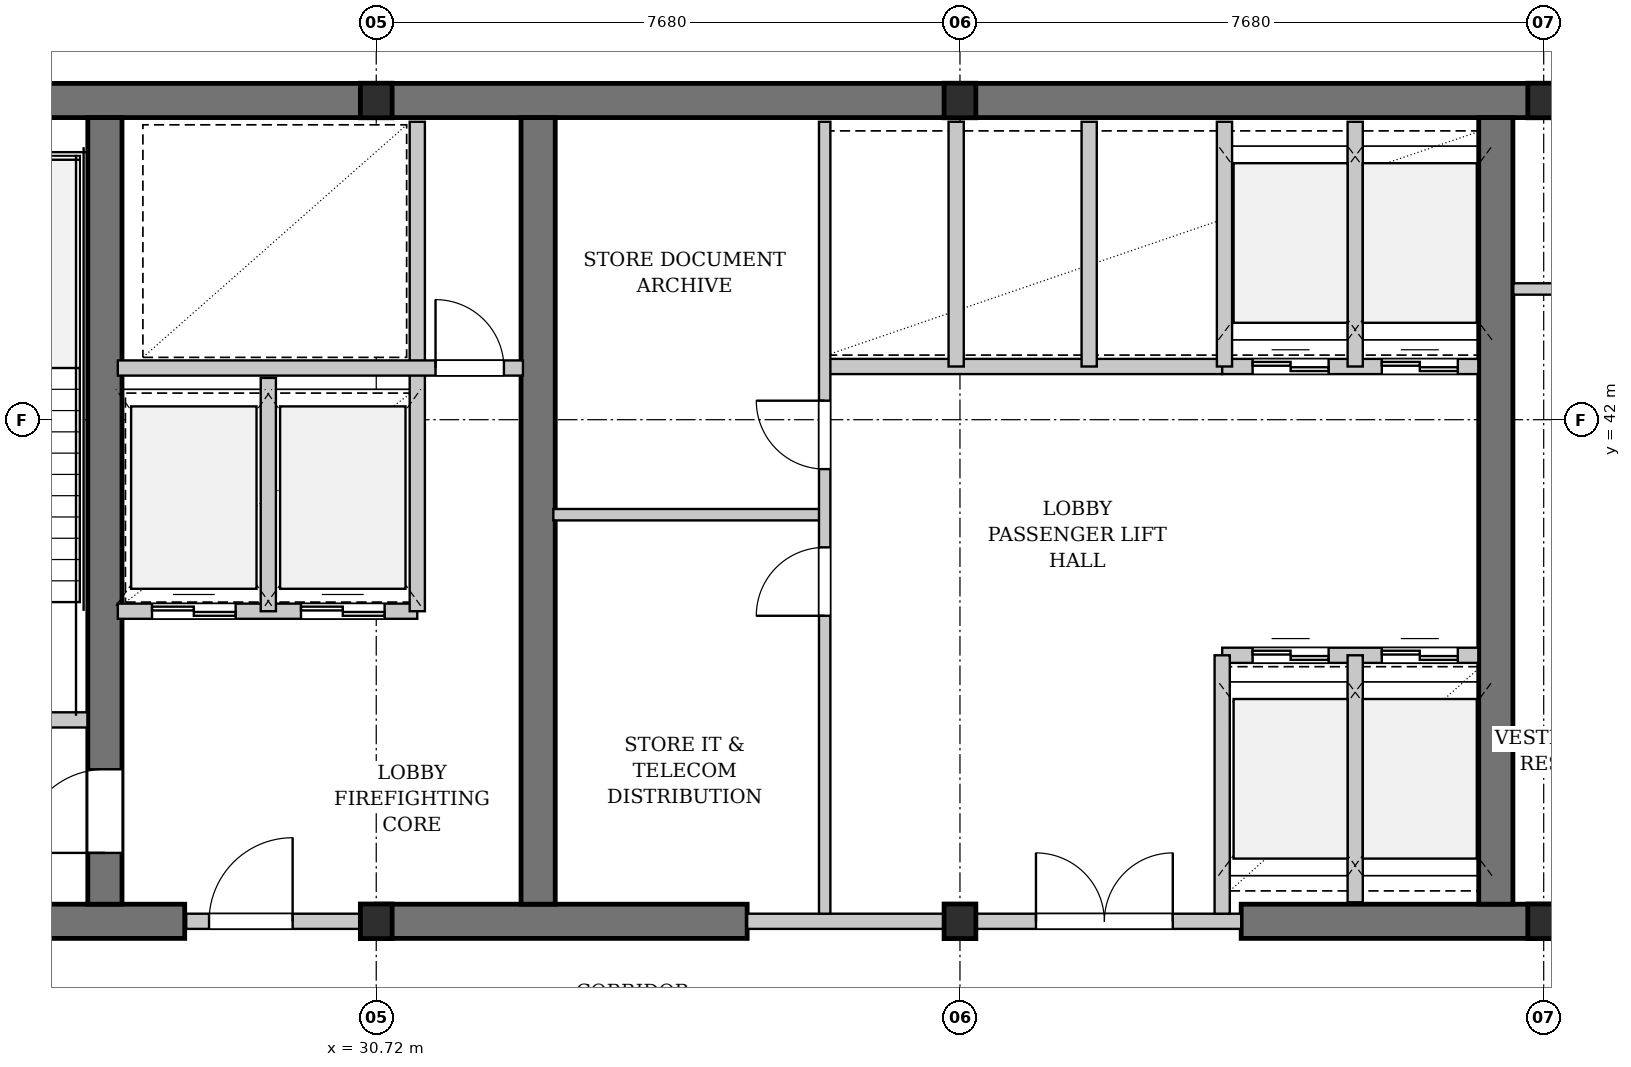
"""IFC4 building model, lengths in metres.
Left out: names, types, materials, properties, quantities, classifications, styles, units other than length and angle.
Written with IfcOpenShell. Run it as: python <this file> out.ifc"""

import sys

from ifc_helpers import new_model, si_unit, direction, frame, frame_2d, origin, origin_2d, place, context, subcontext, project, spatial, rectangle, i_section, extrude, element, fill, save


model = new_model("IFC4")
c1 = context("Model", 3, precision=1e-05, world=origin(), true_north=direction((0.0, 1.0)))
c2 = subcontext(c1, "Body", "Model", "MODEL_VIEW")
j1 = project(units=[si_unit("LENGTHUNIT", "METRE"), si_unit("PLANEANGLEUNIT", "RADIAN")], contexts=[c1])
p1 = place(None, origin())
s1 = spatial("IfcSite", under=j1, at=p1, CompositionType="ELEMENT")
p2 = place(p1, origin())
s2 = spatial("IfcBuilding", under=s1, at=p2, CompositionType="ELEMENT")
p3 = place(p2, frame((0.0, 0.0, 200.3)))
s3 = spatial("IfcBuildingStorey", under=s2, at=p3, CompositionType="ELEMENT", Elevation=200.3)
p4 = place(p3, frame((22.815, 46.2, 0.0), z_axis=(0.0, 0.0, 1.0), x_axis=(1.0, 0.0, 0.0)))
e1 = element("IfcWall", 1, at=p4, inside=s3, PredefinedType="SHEAR", context=c2, shape_type="SweptSolid", body=[
    extrude(rectangle(XDim=31.17, YDim=0.45, at=frame_2d((15.585, 0.0))), origin(), (0.0, 0.0, 1.0), 3.78),
])
p5 = place(p3, frame((22.815, 35.4, 0.0), z_axis=(0.0, 0.0, 1.0), x_axis=(1.0, 0.0, 0.0)))
e2 = element("IfcWall", 2, at=p5, inside=s3, PredefinedType="SHEAR", context=c2, shape_type="SweptSolid", body=[
    extrude(rectangle(XDim=5.385, YDim=0.45, at=frame_2d((2.692, 0.0))), origin(), (0.0, 0.0, 1.0), 3.78),
])
p6 = place(p3, frame((30.72, 35.4, 0.0), z_axis=(0.0, 0.0, 1.0), x_axis=(1.0, 0.0, 0.0)))
e3 = element("IfcWall", 3, at=p6, inside=s3, PredefinedType="SHEAR", context=c2, shape_type="SweptSolid", body=[
    extrude(rectangle(XDim=4.88, YDim=0.45, at=frame_2d((2.44, 0.0))), origin(), (0.0, 0.0, 1.0), 3.78),
])
p7 = place(p3, frame((42.1, 35.4, 0.0), z_axis=(0.0, 0.0, 1.0), x_axis=(1.0, 0.0, 0.0)))
e4 = element("IfcWall", 4, at=p7, inside=s3, PredefinedType="SHEAR", context=c2, shape_type="SweptSolid", body=[
    extrude(rectangle(XDim=8.05, YDim=0.45, at=frame_2d((4.025, 0.0))), origin(), (0.0, 0.0, 1.0), 3.78),
])
p8 = place(p7, frame((4.85, 0.0, 0.0)))
e5 = element("IfcOpeningElement", 5, at=p8, cuts=e4, PredefinedType="OPENING", context=c2, shape_type="SweptSolid", body=[
    extrude(rectangle(XDim=0.9, YDim=2.15, at=frame_2d((0.45, 1.075))), frame((0.0, 0.235, 0.0), z_axis=(0.0, -1.0, 0.0), x_axis=(1.0, 0.0, 0.0)), (0.0, 0.0, 1.0), 0.47),
])
p9 = place(p3, frame((27.15, 35.625, 0.0), z_axis=(0.0, 0.0, 1.0), x_axis=(0.0, 1.0, 0.0)))
e6 = element("IfcWall", 6, at=p9, inside=s3, PredefinedType="SHEAR", context=c2, shape_type="SweptSolid", body=[
    extrude(rectangle(XDim=10.35, YDim=0.45, at=frame_2d((5.175, 0.0))), origin(), (0.0, 0.0, 1.0), 3.78),
])
p10 = place(p9, frame((0.675, 0.0, 0.0)))
e7 = element("IfcOpeningElement", 7, at=p10, cuts=e6, PredefinedType="OPENING", context=c2, shape_type="SweptSolid", body=[
    extrude(rectangle(XDim=1.1, YDim=2.15, at=frame_2d((0.55, 1.075))), frame((0.0, 0.235, 0.0), z_axis=(0.0, -1.0, 0.0), x_axis=(1.0, 0.0, 0.0)), (0.0, 0.0, 1.0), 0.47),
])
for number, where, z_axis, x_axis in (
    (8, (32.85, 35.625, 0.0), (0.0, 0.0, 1.0), (0.0, 1.0, 0.0)),
    (9, (45.45, 35.625, 0.0), (0.0, 0.0, 1.0), (0.0, 1.0, 0.0)),
):
    element("IfcWall", number, at=place(p3, frame(where, z_axis=z_axis, x_axis=x_axis)), inside=s3, PredefinedType="SHEAR", context=c2, shape_type="SweptSolid", body=[
        extrude(rectangle(XDim=10.35, YDim=0.45, at=frame_2d((5.175, 0.0))), origin(), (0.0, 0.0, 1.0), 3.78),
    ])
for number, where, z_axis, x_axis in (
    (10, (30.72, 35.4, 0.0), (0.0, 0.0, 1.0), (1.0, 0.0, 0.0)),
    (11, (30.72, 46.2, 0.0), (0.0, 0.0, 1.0), (1.0, 0.0, 0.0)),
    (12, (38.4, 35.4, 0.0), (0.0, 0.0, 1.0), (1.0, 0.0, 0.0)),
    (13, (38.4, 46.2, 0.0), (0.0, 0.0, 1.0), (1.0, 0.0, 0.0)),
    (14, (46.08, 35.4, 0.0), (0.0, 0.0, 1.0), (1.0, 0.0, 0.0)),
    (15, (46.08, 46.2, 0.0), (0.0, 0.0, 1.0), (1.0, 0.0, 0.0)),
):
    element("IfcColumn", number, at=place(p3, frame(where, z_axis=z_axis, x_axis=x_axis)), inside=s3, PredefinedType="COLUMN", context=c2, shape_type="SweptSolid", body=[
        extrude(i_section(OverallWidth=0.418, OverallDepth=0.455, WebThickness=0.042, FlangeThickness=0.068, FilletRadius=0.015, at=origin_2d()), origin(), (0.0, 0.0, 1.0), 4.2),
    ])
p11 = place(p3, frame((23.3, 38.05, 0.0), z_axis=(0.0, 0.0, 1.0), x_axis=(1.0, 0.0, 0.0)))
e16 = element("IfcWall", 16, at=p11, inside=s3, PredefinedType="PARTITIONING", context=c2, shape_type="SweptSolid", body=[
    extrude(rectangle(XDim=3.62, YDim=0.2, at=frame_2d((1.81, 0.0))), origin(), (0.0, 0.0, 1.0), 3.78),
])
p12 = place(p11, frame((1.26, 0.0, 0.0)))
e17 = element("IfcOpeningElement", 17, at=p12, cuts=e16, PredefinedType="OPENING", context=c2, shape_type="SweptSolid", body=[
    extrude(rectangle(XDim=1.1, YDim=2.15, at=frame_2d((0.55, 1.075))), frame((0.0, 0.11, 0.0), z_axis=(0.0, -1.0, 0.0), x_axis=(1.0, 0.0, 0.0)), (0.0, 0.0, 1.0), 0.22),
])
p13 = place(p3, frame((28.22, 35.4, 0.0), z_axis=(0.0, 0.0, 1.0), x_axis=(1.0, 0.0, 0.0)))
e18 = element("IfcWall", 18, at=p13, inside=s3, PredefinedType="PARTITIONING", context=c2, shape_type="SweptSolid", body=[
    extrude(rectangle(XDim=2.5, YDim=0.2, at=frame_2d((1.25, 0.0))), origin(), (0.0, 0.0, 1.0), 2.961),
])
p14 = place(p13, frame((0.3, 0.0, 0.0)))
e19 = element("IfcOpeningElement", 19, at=p14, cuts=e18, PredefinedType="OPENING", context=c2, shape_type="SweptSolid", body=[
    extrude(rectangle(XDim=1.1, YDim=2.15, at=frame_2d((0.55, 1.075))), frame((0.0, 0.11, 0.0), z_axis=(0.0, -1.0, 0.0), x_axis=(1.0, 0.0, 0.0)), (0.0, 0.0, 1.0), 0.22),
])
p15 = place(p3, frame((27.32, 39.48, 0.0), z_axis=(0.0, 0.0, 1.0), x_axis=(1.0, 0.0, 0.0)))
e20 = element("IfcWall", 20, at=p15, inside=s3, PredefinedType="PARTITIONING", context=c2, shape_type="SweptSolid", body=[
    extrude(rectangle(XDim=3.94, YDim=0.2, at=frame_2d((1.97, 0.0))), origin(), (0.0, 0.0, 1.0), 3.78),
])
p16 = place(p15, frame((0.45, 0.0, 0.0)))
e21 = element("IfcOpeningElement", 21, at=p16, cuts=e20, PredefinedType="OPENING", context=c2, shape_type="SweptSolid", body=[
    extrude(rectangle(XDim=1.1, YDim=2.2, at=frame_2d((0.55, 1.1))), frame((0.0, 0.11, 0.0), z_axis=(0.0, -1.0, 0.0), x_axis=(1.0, 0.0, 0.0)), (0.0, 0.0, 1.0), 0.22),
])
p17 = place(p15, frame((2.41, 0.0, 0.0)))
e22 = element("IfcOpeningElement", 22, at=p17, cuts=e20, PredefinedType="OPENING", context=c2, shape_type="SweptSolid", body=[
    extrude(rectangle(XDim=1.1, YDim=2.2, at=frame_2d((0.55, 1.1))), frame((0.0, 0.11, 0.0), z_axis=(0.0, -1.0, 0.0), x_axis=(1.0, 0.0, 0.0)), (0.0, 0.0, 1.0), 0.22),
])
p18 = place(p3, frame((29.3, 39.48, 0.0), z_axis=(0.0, 0.0, 1.0), x_axis=(0.0, 1.0, 0.0)))
e23 = element("IfcWall", 23, at=p18, inside=s3, PredefinedType="PARTITIONING", context=c2, shape_type="SweptSolid", body=[
    extrude(rectangle(XDim=3.07, YDim=0.2, at=frame_2d((1.535, 0.0))), origin(), (0.0, 0.0, 1.0), 3.78),
])
p19 = place(p3, frame((31.26, 39.48, 0.0), z_axis=(0.0, 0.0, 1.0), x_axis=(0.0, 1.0, 0.0)))
e24 = element("IfcWall", 24, at=p19, inside=s3, PredefinedType="PARTITIONING", context=c2, shape_type="SweptSolid", body=[
    extrude(rectangle(XDim=6.44, YDim=0.2, at=frame_2d((3.22, 0.0))), origin(), (0.0, 0.0, 1.0), 3.78),
])
p20 = place(p3, frame((27.32, 42.68, 0.0), z_axis=(0.0, 0.0, 1.0), x_axis=(1.0, 0.0, 0.0)))
e25 = element("IfcWall", 25, at=p20, inside=s3, PredefinedType="PARTITIONING", context=c2, shape_type="SweptSolid", body=[
    extrude(rectangle(XDim=5.33, YDim=0.2, at=frame_2d((2.665, 0.0))), origin(), (0.0, 0.0, 1.0), 3.78),
])
p21 = place(p20, frame((4.18, 0.0, 0.0)))
e26 = element("IfcOpeningElement", 26, at=p21, cuts=e25, PredefinedType="OPENING", context=c2, shape_type="SweptSolid", body=[
    extrude(rectangle(XDim=0.9, YDim=2.15, at=frame_2d((0.45, 1.075))), frame((0.0, 0.11, 0.0), z_axis=(0.0, -1.0, 0.0), x_axis=(1.0, 0.0, 0.0)), (0.0, 0.0, 1.0), 0.22),
])
p22 = place(p3, frame((35.6, 35.4, 0.0), z_axis=(0.0, 0.0, 1.0), x_axis=(1.0, 0.0, 0.0)))
e27 = element("IfcWall", 27, at=p22, inside=s3, PredefinedType="PARTITIONING", context=c2, shape_type="SweptSolid", body=[
    extrude(rectangle(XDim=6.5, YDim=0.2, at=frame_2d((3.25, 0.0))), origin(), (0.0, 0.0, 1.0), 2.575),
])
p23 = place(p22, frame((3.8, 0.0, 0.0)))
e28 = element("IfcOpeningElement", 28, at=p23, cuts=e27, PredefinedType="OPENING", context=c2, shape_type="SweptSolid", body=[
    extrude(rectangle(XDim=1.8, YDim=2.3, at=frame_2d((0.9, 1.15))), frame((0.0, 0.11, 0.0), z_axis=(0.0, -1.0, 0.0), x_axis=(1.0, 0.0, 0.0)), (0.0, 0.0, 1.0), 0.22),
])
p24 = place(p3, frame((36.6, 42.7, 0.0), z_axis=(0.0, 0.0, 1.0), x_axis=(1.0, 0.0, 0.0)))
e29 = element("IfcWall", 29, at=p24, inside=s3, PredefinedType="PARTITIONING", context=c2, shape_type="SweptSolid", body=[
    extrude(rectangle(XDim=5.25, YDim=0.2, at=frame_2d((2.625, 0.0))), origin(), (0.0, 0.0, 1.0), 3.78),
])
p25 = place(p3, frame((38.35, 42.7, 0.0), z_axis=(0.0, 0.0, 1.0), x_axis=(0.0, 1.0, 0.0)))
e30 = element("IfcWall", 30, at=p25, inside=s3, PredefinedType="PARTITIONING", context=c2, shape_type="SweptSolid", body=[
    extrude(rectangle(XDim=3.22, YDim=0.2, at=frame_2d((1.61, 0.0))), origin(), (0.0, 0.0, 1.0), 2.575),
])
p26 = place(p3, frame((40.1, 42.7, 0.0), z_axis=(0.0, 0.0, 1.0), x_axis=(0.0, 1.0, 0.0)))
e31 = element("IfcWall", 31, at=p26, inside=s3, PredefinedType="PARTITIONING", context=c2, shape_type="SweptSolid", body=[
    extrude(rectangle(XDim=3.22, YDim=0.2, at=frame_2d((1.61, 0.0))), origin(), (0.0, 0.0, 1.0), 3.78),
])
p27 = place(p3, frame((33.05, 40.75, 0.0), z_axis=(0.0, 0.0, 1.0), x_axis=(1.0, 0.0, 0.0)))
e32 = element("IfcWall", 32, at=p27, inside=s3, PredefinedType="PARTITIONING", context=c2, shape_type="SweptSolid", body=[
    extrude(rectangle(XDim=3.57, YDim=0.15, at=frame_2d((1.785, 0.0))), origin(), (0.0, 0.0, 1.0), 3.78),
])
p28 = place(p3, frame((36.62, 35.5, 0.0), z_axis=(0.0, 0.0, 1.0), x_axis=(0.0, 1.0, 0.0)))
e33 = element("IfcWall", 33, at=p28, inside=s3, PredefinedType="PARTITIONING", context=c2, shape_type="SweptSolid", body=[
    extrude(rectangle(XDim=10.42, YDim=0.15, at=frame_2d((5.21, 0.0))), origin(), (0.0, 0.0, 1.0), 3.78),
])
p29 = place(p28, frame((3.92, 0.0, 0.0)))
e34 = element("IfcOpeningElement", 34, at=p29, cuts=e33, PredefinedType="OPENING", context=c2, shape_type="SweptSolid", body=[
    extrude(rectangle(XDim=0.9, YDim=2.15, at=frame_2d((0.45, 1.075))), frame((0.0, 0.085, 0.0), z_axis=(0.0, -1.0, 0.0), x_axis=(1.0, 0.0, 0.0)), (0.0, 0.0, 1.0), 0.17),
])
p30 = place(p28, frame((5.85, 0.0, 0.0)))
e35 = element("IfcOpeningElement", 35, at=p30, cuts=e33, PredefinedType="OPENING", context=c2, shape_type="SweptSolid", body=[
    extrude(rectangle(XDim=0.9, YDim=2.15, at=frame_2d((0.45, 1.075))), frame((0.0, 0.085, 0.0), z_axis=(0.0, -1.0, 0.0), x_axis=(1.0, 0.0, 0.0)), (0.0, 0.0, 1.0), 0.17),
])
p31 = place(p3, frame((41.85, 38.9, 0.0), z_axis=(0.0, 0.0, 1.0), x_axis=(1.0, 0.0, 0.0)))
e36 = element("IfcWall", 36, at=p31, inside=s3, PredefinedType="PARTITIONING", context=c2, shape_type="SweptSolid", body=[
    extrude(rectangle(XDim=3.37, YDim=0.2, at=frame_2d((1.685, 0.0))), origin(), (0.0, 0.0, 1.0), 3.78),
])
p32 = place(p31, frame((0.4, 0.0, 0.0)))
e37 = element("IfcOpeningElement", 37, at=p32, cuts=e36, PredefinedType="OPENING", context=c2, shape_type="SweptSolid", body=[
    extrude(rectangle(XDim=1.0, YDim=2.2, at=frame_2d((0.5, 1.1))), frame((0.0, 0.11, 0.0), z_axis=(0.0, -1.0, 0.0), x_axis=(1.0, 0.0, 0.0)), (0.0, 0.0, 1.0), 0.22),
])
p33 = place(p31, frame((2.1, 0.0, 0.0)))
e38 = element("IfcOpeningElement", 38, at=p33, cuts=e36, PredefinedType="OPENING", context=c2, shape_type="SweptSolid", body=[
    extrude(rectangle(XDim=1.0, YDim=2.2, at=frame_2d((0.5, 1.1))), frame((0.0, 0.11, 0.0), z_axis=(0.0, -1.0, 0.0), x_axis=(1.0, 0.0, 0.0)), (0.0, 0.0, 1.0), 0.22),
])
p34 = place(p3, frame((41.85, 42.7, 0.0), z_axis=(0.0, 0.0, 1.0), x_axis=(1.0, 0.0, 0.0)))
e39 = element("IfcWall", 39, at=p34, inside=s3, PredefinedType="PARTITIONING", context=c2, shape_type="SweptSolid", body=[
    extrude(rectangle(XDim=3.37, YDim=0.2, at=frame_2d((1.685, 0.0))), origin(), (0.0, 0.0, 1.0), 3.78),
])
p35 = place(p34, frame((0.4, 0.0, 0.0)))
e40 = element("IfcOpeningElement", 40, at=p35, cuts=e39, PredefinedType="OPENING", context=c2, shape_type="SweptSolid", body=[
    extrude(rectangle(XDim=1.0, YDim=2.2, at=frame_2d((0.5, 1.1))), frame((0.0, 0.11, 0.0), z_axis=(0.0, -1.0, 0.0), x_axis=(1.0, 0.0, 0.0)), (0.0, 0.0, 1.0), 0.22),
])
p36 = place(p34, frame((2.1, 0.0, 0.0)))
e41 = element("IfcOpeningElement", 41, at=p36, cuts=e39, PredefinedType="OPENING", context=c2, shape_type="SweptSolid", body=[
    extrude(rectangle(XDim=1.0, YDim=2.2, at=frame_2d((0.5, 1.1))), frame((0.0, 0.11, 0.0), z_axis=(0.0, -1.0, 0.0), x_axis=(1.0, 0.0, 0.0)), (0.0, 0.0, 1.0), 0.22),
])
p37 = place(p3, frame((43.6, 35.65, 0.0), z_axis=(0.0, 0.0, 1.0), x_axis=(0.0, 1.0, 0.0)))
e42 = element("IfcWall", 42, at=p37, inside=s3, PredefinedType="PARTITIONING", context=c2, shape_type="SweptSolid", body=[
    extrude(rectangle(XDim=3.25, YDim=0.2, at=frame_2d((1.625, 0.0))), origin(), (0.0, 0.0, 1.0), 3.78),
])
p38 = place(p3, frame((43.6, 42.7, 0.0), z_axis=(0.0, 0.0, 1.0), x_axis=(0.0, 1.0, 0.0)))
e43 = element("IfcWall", 43, at=p38, inside=s3, PredefinedType="PARTITIONING", context=c2, shape_type="SweptSolid", body=[
    extrude(rectangle(XDim=3.22, YDim=0.2, at=frame_2d((1.61, 0.0))), origin(), (0.0, 0.0, 1.0), 3.78),
])
p39 = place(p3, frame((41.85, 35.5, 0.0), z_axis=(0.0, 0.0, 1.0), x_axis=(0.0, 1.0, 0.0)))
e44 = element("IfcWall", 44, at=p39, inside=s3, PredefinedType="PARTITIONING", context=c2, shape_type="SweptSolid", body=[
    extrude(rectangle(XDim=3.4, YDim=0.2, at=frame_2d((1.7, 0.0))), origin(), (0.0, 0.0, 1.0), 3.78),
])
p40 = place(p3, frame((41.88, 42.7, 0.0), z_axis=(0.0, 0.0, 1.0), x_axis=(0.0, 1.0, 0.0)))
e45 = element("IfcWall", 45, at=p40, inside=s3, PredefinedType="PARTITIONING", context=c2, shape_type="SweptSolid", body=[
    extrude(rectangle(XDim=3.22, YDim=0.2, at=frame_2d((1.61, 0.0))), origin(), (0.0, 0.0, 1.0), 3.78),
])
p41 = place(p3, frame((45.68, 43.72, 0.0), z_axis=(0.0, 0.0, 1.0), x_axis=(1.0, 0.0, 0.0)))
e46 = element("IfcWall", 46, at=p41, inside=s3, PredefinedType="PARTITIONING", context=c2, shape_type="SweptSolid", body=[
    extrude(rectangle(XDim=4.5, YDim=0.15, at=frame_2d((2.25, 0.0))), origin(), (0.0, 0.0, 1.0), 3.78),
])
p42 = place(p41, frame((0.55, 0.0, 0.0)))
e47 = element("IfcOpeningElement", 47, at=p42, cuts=e46, PredefinedType="OPENING", context=c2, shape_type="SweptSolid", body=[
    extrude(rectangle(XDim=0.95, YDim=2.15, at=frame_2d((0.475, 1.075))), frame((0.0, 0.085, 0.0), z_axis=(0.0, -1.0, 0.0), x_axis=(1.0, 0.0, 0.0)), (0.0, 0.0, 1.0), 0.17),
])
p43 = place(p14, origin())
e48 = element("IfcDoor", 48, at=p43, inside=s3, OperationType="SINGLE_SWING_RIGHT", PredefinedType="DOOR", context=c2, shape_type="SweptSolid", body=[
    extrude(rectangle(XDim=1.1, YDim=2.15, at=frame_2d((0.55, 1.075))), frame((0.0, 0.025, 0.0), z_axis=(0.0, -1.0, 0.0), x_axis=(1.0, 0.0, 0.0)), (0.0, 0.0, 1.0), 0.05),
])
fill(e19, e48)
p44 = place(p16, origin())
e49 = element("IfcDoor", 49, at=p44, inside=s3, OperationType="DOUBLE_DOOR_SLIDING", PredefinedType="DOOR", context=c2, shape_type="SweptSolid", body=[
    extrude(rectangle(XDim=1.1, YDim=2.2, at=frame_2d((0.55, 1.1))), frame((0.0, 0.025, 0.0), z_axis=(0.0, -1.0, 0.0), x_axis=(1.0, 0.0, 0.0)), (0.0, 0.0, 1.0), 0.05),
])
fill(e21, e49)
p45 = place(p17, origin())
e50 = element("IfcDoor", 50, at=p45, inside=s3, OperationType="DOUBLE_DOOR_SLIDING", PredefinedType="DOOR", context=c2, shape_type="SweptSolid", body=[
    extrude(rectangle(XDim=1.1, YDim=2.2, at=frame_2d((0.55, 1.1))), frame((0.0, 0.025, 0.0), z_axis=(0.0, -1.0, 0.0), x_axis=(1.0, 0.0, 0.0)), (0.0, 0.0, 1.0), 0.05),
])
fill(e22, e50)
p46 = place(p21, origin())
e51 = element("IfcDoor", 51, at=p46, inside=s3, OperationType="SINGLE_SWING_LEFT", PredefinedType="DOOR", context=c2, shape_type="SweptSolid", body=[
    extrude(rectangle(XDim=0.9, YDim=2.15, at=frame_2d((0.45, 1.075))), frame((0.0, 0.025, 0.0), z_axis=(0.0, -1.0, 0.0), x_axis=(1.0, 0.0, 0.0)), (0.0, 0.0, 1.0), 0.05),
])
fill(e26, e51)
p47 = place(p23, origin())
e52 = element("IfcDoor", 52, at=p47, inside=s3, OperationType="DOUBLE_DOOR_SINGLE_SWING", PredefinedType="DOOR", context=c2, shape_type="SweptSolid", body=[
    extrude(rectangle(XDim=1.8, YDim=2.3, at=frame_2d((0.9, 1.15))), frame((0.0, 0.025, 0.0), z_axis=(0.0, -1.0, 0.0), x_axis=(1.0, 0.0, 0.0)), (0.0, 0.0, 1.0), 0.05),
])
fill(e28, e52)
p48 = place(p29, origin())
e53 = element("IfcDoor", 53, at=p48, inside=s3, OperationType="SINGLE_SWING_LEFT", PredefinedType="DOOR", context=c2, shape_type="SweptSolid", body=[
    extrude(rectangle(XDim=0.9, YDim=2.15, at=frame_2d((0.45, 1.075))), frame((0.0, 0.025, 0.0), z_axis=(0.0, -1.0, 0.0), x_axis=(1.0, 0.0, 0.0)), (0.0, 0.0, 1.0), 0.05),
])
fill(e34, e53)
p49 = place(p30, origin())
e54 = element("IfcDoor", 54, at=p49, inside=s3, OperationType="SINGLE_SWING_RIGHT", PredefinedType="DOOR", context=c2, shape_type="SweptSolid", body=[
    extrude(rectangle(XDim=0.9, YDim=2.15, at=frame_2d((0.45, 1.075))), frame((0.0, 0.025, 0.0), z_axis=(0.0, -1.0, 0.0), x_axis=(1.0, 0.0, 0.0)), (0.0, 0.0, 1.0), 0.05),
])
fill(e35, e54)
p50 = place(p32, origin())
e55 = element("IfcDoor", 55, at=p50, inside=s3, OperationType="DOUBLE_DOOR_SLIDING", PredefinedType="DOOR", context=c2, shape_type="SweptSolid", body=[
    extrude(rectangle(XDim=1.0, YDim=2.2, at=frame_2d((0.5, 1.1))), frame((0.0, 0.025, 0.0), z_axis=(0.0, -1.0, 0.0), x_axis=(1.0, 0.0, 0.0)), (0.0, 0.0, 1.0), 0.05),
])
fill(e37, e55)
p51 = place(p33, origin())
e56 = element("IfcDoor", 56, at=p51, inside=s3, OperationType="DOUBLE_DOOR_SLIDING", PredefinedType="DOOR", context=c2, shape_type="SweptSolid", body=[
    extrude(rectangle(XDim=1.0, YDim=2.2, at=frame_2d((0.5, 1.1))), frame((0.0, 0.025, 0.0), z_axis=(0.0, -1.0, 0.0), x_axis=(1.0, 0.0, 0.0)), (0.0, 0.0, 1.0), 0.05),
])
fill(e38, e56)
p52 = place(p35, origin())
e57 = element("IfcDoor", 57, at=p52, inside=s3, OperationType="DOUBLE_DOOR_SLIDING", PredefinedType="DOOR", context=c2, shape_type="SweptSolid", body=[
    extrude(rectangle(XDim=1.0, YDim=2.2, at=frame_2d((0.5, 1.1))), frame((0.0, 0.025, 0.0), z_axis=(0.0, -1.0, 0.0), x_axis=(1.0, 0.0, 0.0)), (0.0, 0.0, 1.0), 0.05),
])
fill(e40, e57)
p53 = place(p36, origin())
e58 = element("IfcDoor", 58, at=p53, inside=s3, OperationType="DOUBLE_DOOR_SLIDING", PredefinedType="DOOR", context=c2, shape_type="SweptSolid", body=[
    extrude(rectangle(XDim=1.0, YDim=2.2, at=frame_2d((0.5, 1.1))), frame((0.0, 0.025, 0.0), z_axis=(0.0, -1.0, 0.0), x_axis=(1.0, 0.0, 0.0)), (0.0, 0.0, 1.0), 0.05),
])
fill(e41, e58)
p54 = place(p10, origin())
e59 = element("IfcDoor", 59, at=p54, inside=s3, OperationType="SINGLE_SWING_LEFT", PredefinedType="DOOR", context=c2, shape_type="SweptSolid", body=[
    extrude(rectangle(XDim=1.1, YDim=2.15, at=frame_2d((0.55, 1.075))), frame((0.0, 0.025, 0.0), z_axis=(0.0, -1.0, 0.0), x_axis=(1.0, 0.0, 0.0)), (0.0, 0.0, 1.0), 0.05),
])
fill(e7, e59)
save(model, sys.argv[1])
